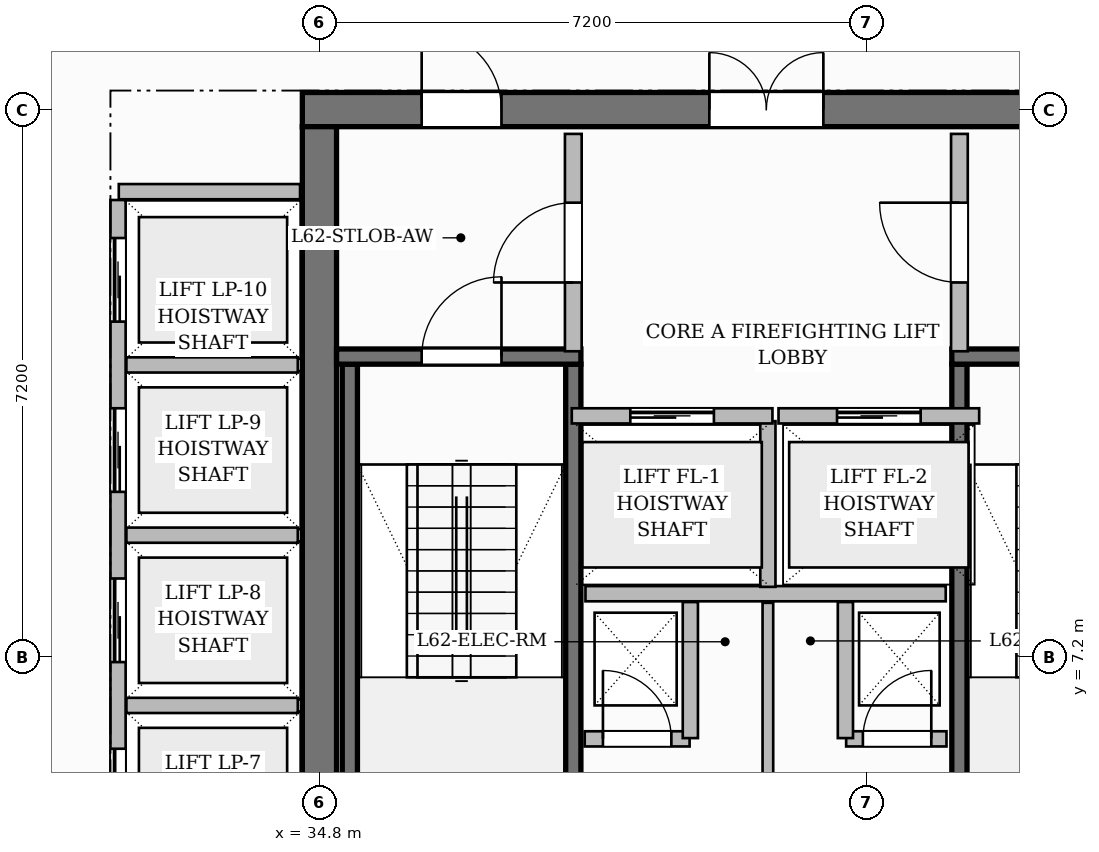
"""IFC4 building model, lengths in metres.
Left out: names, types, materials, properties, quantities, classifications, styles, units other than length and angle.
Written with IfcOpenShell. Run it as: python <this file> out.ifc"""

import sys

from ifc_helpers import new_model, si_unit, direction, frame, frame_2d, origin, place, context, subcontext, project, spatial, rectangle, extrude, source, transform, mapped, element, fill, save


model = new_model("IFC4")
c1 = context("Model", 3, precision=1e-05, world=origin(), true_north=direction((0.0, 1.0)))
c2 = subcontext(c1, "Body", "Model", "MODEL_VIEW")
j1 = project(units=[si_unit("LENGTHUNIT", "METRE"), si_unit("PLANEANGLEUNIT", "RADIAN")], contexts=[c1])
p1 = place(None, origin())
s1 = spatial("IfcSite", under=j1, at=p1, CompositionType="ELEMENT")
p2 = place(p1, origin())
s2 = spatial("IfcBuilding", under=s1, at=p2, CompositionType="ELEMENT")
p3 = place(p2, frame((0.0, 0.0, 248.1)))
s3 = spatial("IfcBuildingStorey", under=s2, at=p3, CompositionType="ELEMENT", Elevation=248.1)
p4 = place(p3, frame((34.575, 14.4, 0.0), z_axis=(0.0, 0.0, 1.0), x_axis=(1.0, 0.0, 0.0)))
e1 = element("IfcWall", 1, at=p4, inside=s3, PredefinedType="SHEAR", context=c2, shape_type="SweptSolid", body=[
    extrude(rectangle(XDim=15.45, YDim=0.45, at=frame_2d((7.725, 0.0))), origin(), (0.0, 0.0, 1.0), 3.85),
])
p5 = place(p4, frame((5.355, 0.0, 0.0)))
e2 = element("IfcOpeningElement", 2, at=p5, cuts=e1, PredefinedType="OPENING", context=c2, shape_type="SweptSolid", body=[
    extrude(rectangle(XDim=1.5, YDim=2.2, at=frame_2d((0.75, 1.1))), frame((0.0, 0.235, 0.0), z_axis=(0.0, -1.0, 0.0), x_axis=(1.0, 0.0, 0.0)), (0.0, 0.0, 1.0), 0.47),
])
p6 = place(p4, frame((1.57, 0.0, 0.0)))
e3 = element("IfcOpeningElement", 3, at=p6, cuts=e1, PredefinedType="OPENING", context=c2, shape_type="SweptSolid", body=[
    extrude(rectangle(XDim=1.05, YDim=2.15, at=frame_2d((0.525, 1.075))), frame((0.0, 0.235, 0.0), z_axis=(0.0, -1.0, 0.0), x_axis=(1.0, 0.0, 0.0)), (0.0, 0.0, 1.0), 0.47),
])
p7 = place(p4, frame((11.2, 0.0, 0.0)))
e4 = element("IfcOpeningElement", 4, at=p7, cuts=e1, PredefinedType="OPENING", context=c2, shape_type="SweptSolid", body=[
    extrude(rectangle(XDim=1.05, YDim=2.15, at=frame_2d((0.525, 1.075))), frame((0.0, 0.235, 0.0), z_axis=(0.0, -1.0, 0.0), x_axis=(1.0, 0.0, 0.0)), (0.0, 0.0, 1.0), 0.47),
])
p8 = place(p3, frame((34.8, 3.825, 0.0), z_axis=(0.0, 0.0, 1.0), x_axis=(0.0, 1.0, 0.0)))
e5 = element("IfcWall", 5, at=p8, inside=s3, PredefinedType="SHEAR", context=c2, shape_type="SweptSolid", body=[
    extrude(rectangle(XDim=10.35, YDim=0.45, at=frame_2d((5.175, 0.0))), origin(), (0.0, 0.0, 1.0), 3.85),
])
for number, where, z_axis, x_axis in (
    (6, (35.2, 4.1, 0.0), (0.0, 0.0, 1.0), (0.0, 1.0, 0.0)),
    (7, (38.14, 4.1, 0.0), (0.0, 0.0, 1.0), (0.0, 1.0, 0.0)),
):
    element("IfcWall", number, at=place(p3, frame(where, z_axis=z_axis, x_axis=x_axis)), inside=s3, PredefinedType="SHEAR", context=c2, shape_type="SweptSolid", body=[
        extrude(rectangle(XDim=6.95, YDim=0.2, at=frame_2d((3.475, 0.0))), origin(), (0.0, 0.0, 1.0), 3.85),
    ])
p9 = place(p3, frame((35.025, 11.15, 0.0), z_axis=(0.0, 0.0, 1.0), x_axis=(1.0, 0.0, 0.0)))
e8 = element("IfcWall", 8, at=p9, inside=s3, PredefinedType="SHEAR", context=c2, shape_type="SweptSolid", body=[
    extrude(rectangle(XDim=3.215, YDim=0.2, at=frame_2d((1.607, 0.0))), origin(), (0.0, 0.0, 1.0), 3.85),
])
p10 = place(p9, frame((1.12, 0.0, 0.0)))
e9 = element("IfcOpeningElement", 9, at=p10, cuts=e8, PredefinedType="OPENING", context=c2, shape_type="SweptSolid", body=[
    extrude(rectangle(XDim=1.05, YDim=2.2, at=frame_2d((0.525, 1.1))), frame((0.0, 0.11, 0.0), z_axis=(0.0, -1.0, 0.0), x_axis=(1.0, 0.0, 0.0)), (0.0, 0.0, 1.0), 0.22),
])
p11 = place(p3, frame((43.22, 4.1, 0.0), z_axis=(0.0, 0.0, 1.0), x_axis=(0.0, 1.0, 0.0)))
e10 = element("IfcWall", 10, at=p11, inside=s3, PredefinedType="SHEAR", context=c2, shape_type="SweptSolid", body=[
    extrude(rectangle(XDim=6.95, YDim=0.2, at=frame_2d((3.475, 0.0))), origin(), (0.0, 0.0, 1.0), 3.85),
])
p12 = place(p3, frame((43.12, 11.15, 0.0), z_axis=(0.0, 0.0, 1.0), x_axis=(1.0, 0.0, 0.0)))
e11 = element("IfcWall", 11, at=p12, inside=s3, PredefinedType="SHEAR", context=c2, shape_type="SweptSolid", body=[
    extrude(rectangle(XDim=6.455, YDim=0.2, at=frame_2d((3.228, 0.0))), origin(), (0.0, 0.0, 1.0), 3.85),
])
p13 = place(p12, frame((1.045, 0.0, 0.0)))
e12 = element("IfcOpeningElement", 12, at=p13, cuts=e11, PredefinedType="OPENING", context=c2, shape_type="SweptSolid", body=[
    extrude(rectangle(XDim=1.05, YDim=2.2, at=frame_2d((0.525, 1.1))), frame((0.0, 0.11, 0.0), z_axis=(0.0, -1.0, 0.0), x_axis=(1.0, 0.0, 0.0)), (0.0, 0.0, 1.0), 0.22),
])
p14 = place(p12, frame((4.125, 0.0, 0.0)))
e13 = element("IfcOpeningElement", 13, at=p14, cuts=e11, PredefinedType="OPENING", context=c2, shape_type="SweptSolid", body=[
    extrude(rectangle(XDim=1.05, YDim=2.2, at=frame_2d((0.525, 1.1))), frame((0.0, 0.11, 0.0), z_axis=(0.0, -1.0, 0.0), x_axis=(1.0, 0.0, 0.0)), (0.0, 0.0, 1.0), 0.22),
])
p15 = place(p3, frame((38.3, 8.03, 0.0), z_axis=(0.0, 0.0, 1.0), x_axis=(1.0, 0.0, 0.0)))
e14 = element("IfcWall", 14, at=p15, inside=s3, PredefinedType="PARTITIONING", context=c2, shape_type="SweptSolid", body=[
    extrude(rectangle(XDim=4.74, YDim=0.2, at=frame_2d((2.37, 0.0))), origin(), (0.0, 0.0, 1.0), 3.6),
])
p16 = place(p3, frame((40.7, 8.12, 0.0), z_axis=(0.0, 0.0, 1.0), x_axis=(0.0, 1.0, 0.0)))
e15 = element("IfcWall", 15, at=p16, inside=s3, PredefinedType="PARTITIONING", context=c2, shape_type="SweptSolid", body=[
    extrude(rectangle(XDim=2.18, YDim=0.2, at=frame_2d((1.09, 0.0))), origin(), (0.0, 0.0, 1.0), 3.6),
])
p17 = place(p3, frame((38.14, 11.22, 0.0), z_axis=(0.0, 0.0, 1.0), x_axis=(0.0, 1.0, 0.0)))
e16 = element("IfcWall", 16, at=p17, inside=s3, PredefinedType="PARTITIONING", context=c2, shape_type="SweptSolid", body=[
    extrude(rectangle(XDim=2.86, YDim=0.22, at=frame_2d((1.43, 0.0))), origin(), (0.0, 0.0, 1.0), 3.6),
])
p18 = place(p17, frame((0.905, 0.0, 0.0)))
e17 = element("IfcOpeningElement", 17, at=p18, cuts=e16, PredefinedType="OPENING", context=c2, shape_type="SweptSolid", body=[
    extrude(rectangle(XDim=1.05, YDim=2.15, at=frame_2d((0.525, 1.075))), frame((0.0, 0.12, 0.0), z_axis=(0.0, -1.0, 0.0), x_axis=(1.0, 0.0, 0.0)), (0.0, 0.0, 1.0), 0.24),
])
p19 = place(p3, frame((43.22, 11.22, 0.0), z_axis=(0.0, 0.0, 1.0), x_axis=(0.0, 1.0, 0.0)))
e18 = element("IfcWall", 18, at=p19, inside=s3, PredefinedType="PARTITIONING", context=c2, shape_type="SweptSolid", body=[
    extrude(rectangle(XDim=2.86, YDim=0.22, at=frame_2d((1.43, 0.0))), origin(), (0.0, 0.0, 1.0), 3.6),
])
p20 = place(p19, frame((0.905, 0.0, 0.0)))
e19 = element("IfcOpeningElement", 19, at=p20, cuts=e18, PredefinedType="OPENING", context=c2, shape_type="SweptSolid", body=[
    extrude(rectangle(XDim=1.05, YDim=2.15, at=frame_2d((0.525, 1.075))), frame((0.0, 0.12, 0.0), z_axis=(0.0, -1.0, 0.0), x_axis=(1.0, 0.0, 0.0)), (0.0, 0.0, 1.0), 0.24),
])
p21 = place(p3, frame((38.29, 6.12, 0.0), z_axis=(0.0, 0.0, 1.0), x_axis=(1.0, 0.0, 0.0)))
e20 = element("IfcWall", 20, at=p21, inside=s3, PredefinedType="PARTITIONING", context=c2, shape_type="SweptSolid", body=[
    extrude(rectangle(XDim=1.38, YDim=0.2, at=frame_2d((0.69, 0.0))), origin(), (0.0, 0.0, 1.0), 3.6),
])
p22 = place(p21, frame((0.24, 0.0, 0.0)))
e21 = element("IfcOpeningElement", 21, at=p22, cuts=e20, PredefinedType="OPENING", context=c2, shape_type="SweptSolid", body=[
    extrude(rectangle(XDim=0.9, YDim=2.1, at=frame_2d((0.45, 1.05))), frame((0.0, 0.11, 0.0), z_axis=(0.0, -1.0, 0.0), x_axis=(1.0, 0.0, 0.0)), (0.0, 0.0, 1.0), 0.22),
])
p23 = place(p3, frame((39.68, 6.13, 0.0), z_axis=(0.0, 0.0, 1.0), x_axis=(0.0, 1.0, 0.0)))
e22 = element("IfcWall", 22, at=p23, inside=s3, PredefinedType="PARTITIONING", context=c2, shape_type="SweptSolid", body=[
    extrude(rectangle(XDim=1.79, YDim=0.2, at=frame_2d((0.895, 0.0))), origin(), (0.0, 0.0, 1.0), 3.6),
])
p24 = place(p3, frame((41.73, 6.12, 0.0), z_axis=(0.0, 0.0, 1.0), x_axis=(1.0, 0.0, 0.0)))
e23 = element("IfcWall", 23, at=p24, inside=s3, PredefinedType="PARTITIONING", context=c2, shape_type="SweptSolid", body=[
    extrude(rectangle(XDim=1.32, YDim=0.2, at=frame_2d((0.66, 0.0))), origin(), (0.0, 0.0, 1.0), 3.6),
])
p25 = place(p24, frame((0.22, 0.0, 0.0)))
e24 = element("IfcOpeningElement", 24, at=p25, cuts=e23, PredefinedType="OPENING", context=c2, shape_type="SweptSolid", body=[
    extrude(rectangle(XDim=0.9, YDim=2.1, at=frame_2d((0.45, 1.05))), frame((0.0, 0.11, 0.0), z_axis=(0.0, -1.0, 0.0), x_axis=(1.0, 0.0, 0.0)), (0.0, 0.0, 1.0), 0.22),
])
p26 = place(p3, frame((41.72, 6.13, 0.0), z_axis=(0.0, 0.0, 1.0), x_axis=(0.0, 1.0, 0.0)))
e25 = element("IfcWall", 25, at=p26, inside=s3, PredefinedType="PARTITIONING", context=c2, shape_type="SweptSolid", body=[
    extrude(rectangle(XDim=1.79, YDim=0.2, at=frame_2d((0.895, 0.0))), origin(), (0.0, 0.0, 1.0), 3.6),
])
p27 = place(p3, frame((40.7, 3.845, 0.0), z_axis=(0.0, 0.0, 1.0), x_axis=(0.0, 1.0, 0.0)))
e26 = element("IfcWall", 26, at=p27, inside=s3, PredefinedType="PARTITIONING", context=c2, shape_type="SweptSolid", body=[
    extrude(rectangle(XDim=4.065, YDim=0.14, at=frame_2d((2.032, 0.0))), origin(), (0.0, 0.0, 1.0), 3.6),
])
p28 = place(p3, frame((32.16, 13.32, 0.0), z_axis=(0.0, 0.0, 1.0), x_axis=(1.0, 0.0, 0.0)))
e27 = element("IfcWall", 27, at=p28, inside=s3, PredefinedType="PARTITIONING", context=c2, shape_type="SweptSolid", body=[
    extrude(rectangle(XDim=2.385, YDim=0.2, at=frame_2d((1.192, 0.0))), origin(), (0.0, 0.0, 1.0), 3.6),
])
p29 = place(p3, frame((32.15, 4.39, 0.0), z_axis=(0.0, 0.0, 1.0), x_axis=(0.0, 1.0, 0.0)))
e28 = element("IfcWall", 28, at=p29, inside=s3, PredefinedType="PARTITIONING", context=c2, shape_type="SweptSolid", body=[
    extrude(rectangle(XDim=8.82, YDim=0.2, at=frame_2d((4.41, 0.0))), origin(), (0.0, 0.0, 1.0), 3.6),
])
p30 = place(p29, frame((0.5, 0.0, 0.0)))
e29 = element("IfcOpeningElement", 29, at=p30, cuts=e28, PredefinedType="OPENING", context=c2, shape_type="SweptSolid", body=[
    extrude(rectangle(XDim=1.1, YDim=2.2, at=frame_2d((0.55, 1.1))), frame((0.0, 0.11, 0.0), z_axis=(0.0, -1.0, 0.0), x_axis=(1.0, 0.0, 0.0)), (0.0, 0.0, 1.0), 0.22),
])
p31 = place(p29, frame((2.74, 0.0, 0.0)))
e30 = element("IfcOpeningElement", 30, at=p31, cuts=e28, PredefinedType="OPENING", context=c2, shape_type="SweptSolid", body=[
    extrude(rectangle(XDim=1.1, YDim=2.2, at=frame_2d((0.55, 1.1))), frame((0.0, 0.11, 0.0), z_axis=(0.0, -1.0, 0.0), x_axis=(1.0, 0.0, 0.0)), (0.0, 0.0, 1.0), 0.22),
])
p32 = place(p29, frame((4.98, 0.0, 0.0)))
e31 = element("IfcOpeningElement", 31, at=p32, cuts=e28, PredefinedType="OPENING", context=c2, shape_type="SweptSolid", body=[
    extrude(rectangle(XDim=1.1, YDim=2.2, at=frame_2d((0.55, 1.1))), frame((0.0, 0.11, 0.0), z_axis=(0.0, -1.0, 0.0), x_axis=(1.0, 0.0, 0.0)), (0.0, 0.0, 1.0), 0.22),
])
p33 = place(p29, frame((7.22, 0.0, 0.0)))
e32 = element("IfcOpeningElement", 32, at=p33, cuts=e28, PredefinedType="OPENING", context=c2, shape_type="SweptSolid", body=[
    extrude(rectangle(XDim=1.1, YDim=2.2, at=frame_2d((0.55, 1.1))), frame((0.0, 0.11, 0.0), z_axis=(0.0, -1.0, 0.0), x_axis=(1.0, 0.0, 0.0)), (0.0, 0.0, 1.0), 0.22),
])
for number, where, z_axis, x_axis in (
    (33, (32.26, 6.56, 0.0), (0.0, 0.0, 1.0), (1.0, 0.0, 0.0)),
    (34, (32.26, 8.8, 0.0), (0.0, 0.0, 1.0), (1.0, 0.0, 0.0)),
    (35, (32.26, 11.04, 0.0), (0.0, 0.0, 1.0), (1.0, 0.0, 0.0)),
):
    element("IfcWall", number, at=place(p3, frame(where, z_axis=z_axis, x_axis=x_axis)), inside=s3, PredefinedType="PARTITIONING", context=c2, shape_type="SweptSolid", body=[
        extrude(rectangle(XDim=2.255, YDim=0.2, at=frame_2d((1.127, 0.0))), origin(), (0.0, 0.0, 1.0), 3.6),
    ])
p34 = place(p3, frame((38.12, 10.37, 0.0), z_axis=(0.0, 0.0, 1.0), x_axis=(1.0, 0.0, 0.0)))
e36 = element("IfcWall", 36, at=p34, inside=s3, PredefinedType="PARTITIONING", context=c2, shape_type="SweptSolid", body=[
    extrude(rectangle(XDim=2.64, YDim=0.2, at=frame_2d((1.32, 0.0))), origin(), (0.0, 0.0, 1.0), 3.6),
])
p35 = place(p34, frame((0.77, 0.0, 0.0)))
e37 = element("IfcOpeningElement", 37, at=p35, cuts=e36, PredefinedType="OPENING", context=c2, shape_type="SweptSolid", body=[
    extrude(rectangle(XDim=1.1, YDim=2.2, at=frame_2d((0.55, 1.1))), frame((0.0, 0.11, 0.0), z_axis=(0.0, -1.0, 0.0), x_axis=(1.0, 0.0, 0.0)), (0.0, 0.0, 1.0), 0.22),
])
p36 = place(p3, frame((40.84, 10.37, 0.0), z_axis=(0.0, 0.0, 1.0), x_axis=(1.0, 0.0, 0.0)))
e38 = element("IfcWall", 38, at=p36, inside=s3, PredefinedType="PARTITIONING", context=c2, shape_type="SweptSolid", body=[
    extrude(rectangle(XDim=2.64, YDim=0.2, at=frame_2d((1.32, 0.0))), origin(), (0.0, 0.0, 1.0), 3.6),
])
p37 = place(p36, frame((0.77, 0.0, 0.0)))
e39 = element("IfcOpeningElement", 39, at=p37, cuts=e38, PredefinedType="OPENING", context=c2, shape_type="SweptSolid", body=[
    extrude(rectangle(XDim=1.1, YDim=2.2, at=frame_2d((0.55, 1.1))), frame((0.0, 0.11, 0.0), z_axis=(0.0, -1.0, 0.0), x_axis=(1.0, 0.0, 0.0)), (0.0, 0.0, 1.0), 0.22),
])
m1 = source(origin(), c2, "Body", "SweptSolid", [
    extrude(rectangle(XDim=1.05, YDim=2.2, at=frame_2d((0.525, 1.1))), frame((0.0, 0.025, 0.0), z_axis=(0.0, -1.0, 0.0), x_axis=(1.0, 0.0, 0.0)), (0.0, 0.0, 1.0), 0.05),
])
p38 = place(p10, origin())
e40 = element("IfcDoor", 40, at=p38, inside=s3, OperationType="SINGLE_SWING_RIGHT", PredefinedType="DOOR", context=c2, shape_type="MappedRepresentation", body=[
    mapped(m1, transform((0.0, 0.0, 0.0), scale=1.0)),
])
fill(e9, e40)
m2 = source(origin(), c2, "Body", "SweptSolid", [
    extrude(rectangle(XDim=1.05, YDim=2.15, at=frame_2d((0.525, 1.075))), frame((0.0, 0.025, 0.0), z_axis=(0.0, -1.0, 0.0), x_axis=(1.0, 0.0, 0.0)), (0.0, 0.0, 1.0), 0.05),
])
p39 = place(p18, origin())
e41 = element("IfcDoor", 41, at=p39, inside=s3, OperationType="SINGLE_SWING_LEFT", PredefinedType="DOOR", context=c2, shape_type="MappedRepresentation", body=[
    mapped(m2, transform((0.0, 0.0, 0.0), scale=1.0)),
])
fill(e17, e41)
p40 = place(p20, origin())
e42 = element("IfcDoor", 42, at=p40, inside=s3, OperationType="SINGLE_SWING_RIGHT", PredefinedType="DOOR", context=c2, shape_type="MappedRepresentation", body=[
    mapped(m2, transform((0.0, 0.0, 0.0), scale=1.0)),
])
fill(e19, e42)
m3 = source(origin(), c2, "Body", "SweptSolid", [
    extrude(rectangle(XDim=1.5, YDim=2.2, at=frame_2d((0.75, 1.1))), frame((0.0, 0.025, 0.0), z_axis=(0.0, -1.0, 0.0), x_axis=(1.0, 0.0, 0.0)), (0.0, 0.0, 1.0), 0.05),
])
p41 = place(p5, origin())
e43 = element("IfcDoor", 43, at=p41, inside=s3, OperationType="DOUBLE_DOOR_SINGLE_SWING", PredefinedType="DOOR", context=c2, shape_type="MappedRepresentation", body=[
    mapped(m3, transform((0.0, 0.0, 0.0), scale=1.0)),
])
fill(e2, e43)
p42 = place(p6, origin())
e44 = element("IfcDoor", 44, at=p42, inside=s3, OperationType="SINGLE_SWING_LEFT", PredefinedType="DOOR", context=c2, shape_type="MappedRepresentation", body=[
    mapped(m2, transform((0.0, 0.0, 0.0), scale=1.0)),
])
fill(e3, e44)
m4 = source(origin(), c2, "Body", "SweptSolid", [
    extrude(rectangle(XDim=0.9, YDim=2.1, at=frame_2d((0.45, 1.05))), frame((0.0, 0.025, 0.0), z_axis=(0.0, -1.0, 0.0), x_axis=(1.0, 0.0, 0.0)), (0.0, 0.0, 1.0), 0.05),
])
p43 = place(p22, origin())
e45 = element("IfcDoor", 45, at=p43, inside=s3, OperationType="SINGLE_SWING_LEFT", PredefinedType="DOOR", context=c2, shape_type="MappedRepresentation", body=[
    mapped(m4, transform((0.0, 0.0, 0.0), scale=1.0)),
])
fill(e21, e45)
p44 = place(p25, origin())
e46 = element("IfcDoor", 46, at=p44, inside=s3, OperationType="SINGLE_SWING_RIGHT", PredefinedType="DOOR", context=c2, shape_type="MappedRepresentation", body=[
    mapped(m4, transform((0.0, 0.0, 0.0), scale=1.0)),
])
fill(e24, e46)
m5 = source(origin(), c2, "Body", "SweptSolid", [
    extrude(rectangle(XDim=1.1, YDim=2.2, at=frame_2d((0.55, 1.1))), frame((0.0, 0.025, 0.0), z_axis=(0.0, -1.0, 0.0), x_axis=(1.0, 0.0, 0.0)), (0.0, 0.0, 1.0), 0.05),
])
p45 = place(p35, origin())
e47 = element("IfcDoor", 47, at=p45, inside=s3, OperationType="SLIDING_TO_LEFT", PredefinedType="DOOR", context=c2, shape_type="MappedRepresentation", body=[
    mapped(m5, transform((0.0, 0.0, 0.0), scale=1.0)),
])
fill(e37, e47)
p46 = place(p37, origin())
e48 = element("IfcDoor", 48, at=p46, inside=s3, OperationType="SLIDING_TO_LEFT", PredefinedType="DOOR", context=c2, shape_type="MappedRepresentation", body=[
    mapped(m5, transform((0.0, 0.0, 0.0), scale=1.0)),
])
fill(e39, e48)
p47 = place(p30, origin())
e49 = element("IfcDoor", 49, at=p47, inside=s3, OperationType="SLIDING_TO_LEFT", PredefinedType="DOOR", context=c2, shape_type="MappedRepresentation", body=[
    mapped(m5, transform((0.0, 0.0, 0.0), scale=1.0)),
])
fill(e29, e49)
p48 = place(p31, origin())
e50 = element("IfcDoor", 50, at=p48, inside=s3, OperationType="SLIDING_TO_LEFT", PredefinedType="DOOR", context=c2, shape_type="MappedRepresentation", body=[
    mapped(m5, transform((0.0, 0.0, 0.0), scale=1.0)),
])
fill(e30, e50)
p49 = place(p32, origin())
e51 = element("IfcDoor", 51, at=p49, inside=s3, OperationType="SLIDING_TO_LEFT", PredefinedType="DOOR", context=c2, shape_type="MappedRepresentation", body=[
    mapped(m5, transform((0.0, 0.0, 0.0), scale=1.0)),
])
fill(e31, e51)
p50 = place(p33, origin())
e52 = element("IfcDoor", 52, at=p50, inside=s3, OperationType="SLIDING_TO_LEFT", PredefinedType="DOOR", context=c2, shape_type="MappedRepresentation", body=[
    mapped(m5, transform((0.0, 0.0, 0.0), scale=1.0)),
])
fill(e32, e52)
save(model, sys.argv[1])
